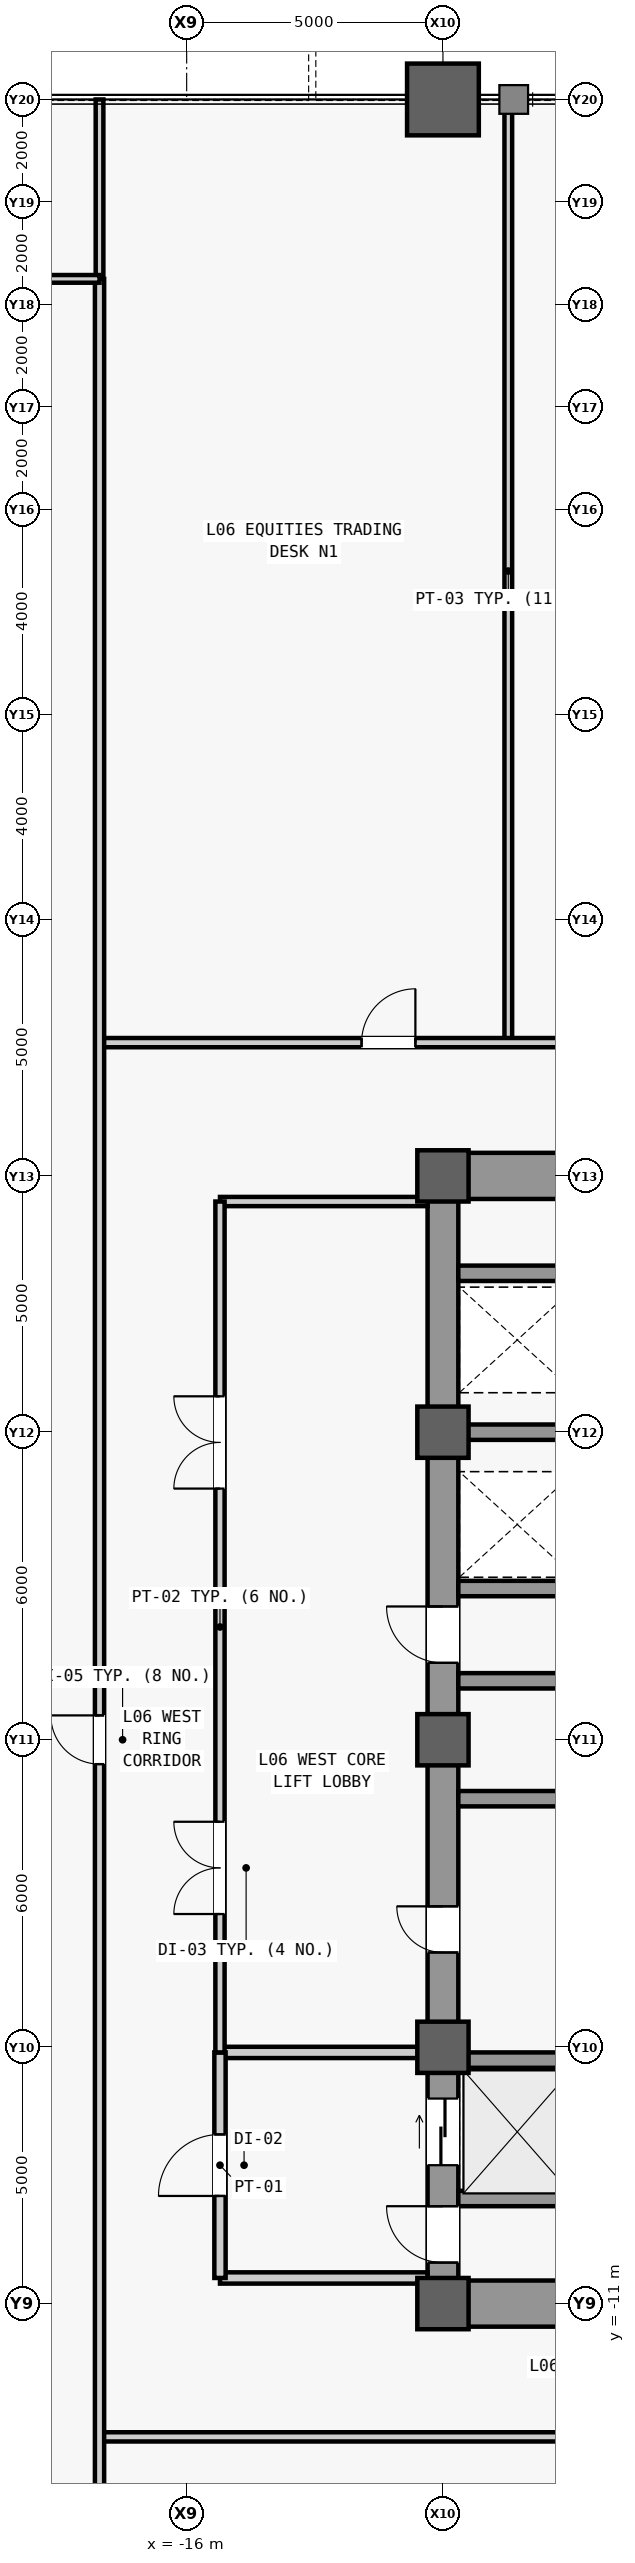
"""IFC4 building model, lengths in metres.
Left out: names, types, materials, properties, quantities, classifications, styles, units other than length and angle.
Written with IfcOpenShell. Run it as: python <this file> out.ifc"""

import sys

from ifc_helpers import new_model, si_unit, direction, frame, frame_2d, origin, origin_2d, place, context, subcontext, project, spatial, rectangle, hollow_rectangle, extrude, source, transform, mapped, element, fill, save


model = new_model("IFC4")
c1 = context("Model", 3, precision=1e-05, world=origin(), true_north=direction((0.0, 1.0)))
c2 = subcontext(c1, "Body", "Model", "MODEL_VIEW")
j1 = project(units=[si_unit("LENGTHUNIT", "METRE"), si_unit("PLANEANGLEUNIT", "RADIAN")], contexts=[c1])
p1 = place(None, origin())
s1 = spatial("IfcSite", under=j1, at=p1, CompositionType="ELEMENT")
p2 = place(p1, origin())
s2 = spatial("IfcBuilding", under=s1, at=p2, CompositionType="ELEMENT")
p3 = place(p2, frame((0.0, 0.0, 32.6)))
s3 = spatial("IfcBuildingStorey", under=s2, at=p3, CompositionType="ELEMENT", Elevation=32.6)
m1 = source(origin(), c2, "Body", "SweptSolid", [
    extrude(rectangle(XDim=22.0, YDim=0.6, at=frame_2d((11.0, 0.0))), origin(), (0.0, 0.0, 1.0), 3.94),
])
p4 = place(p3, frame((-11.0, -11.0, 0.0), z_axis=(0.0, 0.0, 1.0), x_axis=(0.0, 1.0, 0.0)))
e1 = element("IfcWall", 1, at=p4, inside=s3, PredefinedType="SHEAR", context=c2, shape_type="MappedRepresentation", body=[
    mapped(m1, transform((0.0, 0.0, 0.0), scale=1.0)),
])
m2 = source(origin(), c2, "Body", "SweptSolid", [
    extrude(rectangle(XDim=1.1, YDim=2.2, at=frame_2d((0.55, 1.1))), frame((0.0, 0.31, 0.0), z_axis=(0.0, -1.0, 0.0), x_axis=(1.0, 0.0, 0.0)), (0.0, 0.0, 1.0), 0.62),
])
p5 = place(p4, frame((0.8, 0.0, 0.0)))
e2 = element("IfcOpeningElement", 2, at=p5, cuts=e1, PredefinedType="OPENING", context=c2, shape_type="MappedRepresentation", body=[
    mapped(m2, transform((0.0, 0.0, 0.0), scale=1.0)),
])
p6 = place(p4, frame((12.5, 0.0, 0.0)))
e3 = element("IfcOpeningElement", 3, at=p6, cuts=e1, PredefinedType="OPENING", context=c2, shape_type="MappedRepresentation", body=[
    mapped(m2, transform((0.0, 0.0, 0.0), scale=1.0)),
])
m3 = source(origin(), c2, "Body", "SweptSolid", [
    extrude(rectangle(XDim=0.9, YDim=2.15, at=frame_2d((0.45, 1.075))), frame((0.0, 0.31, 0.0), z_axis=(0.0, -1.0, 0.0), x_axis=(1.0, 0.0, 0.0)), (0.0, 0.0, 1.0), 0.62),
])
p7 = place(p4, frame((6.85, 0.0, 0.0)))
e4 = element("IfcOpeningElement", 4, at=p7, cuts=e1, PredefinedType="OPENING", context=c2, shape_type="MappedRepresentation", body=[
    mapped(m3, transform((0.0, 0.0, 0.0), scale=1.0)),
])
m4 = source(origin(), c2, "Body", "SweptSolid", [
    extrude(rectangle(XDim=1.3, YDim=2.3, at=frame_2d((0.65, 1.15))), frame((0.0, 0.31, 0.0), z_axis=(0.0, -1.0, 0.0), x_axis=(1.0, 0.0, 0.0)), (0.0, 0.0, 1.0), 0.62),
])
p8 = place(p4, frame((2.7, 0.0, 0.0)))
e5 = element("IfcOpeningElement", 5, at=p8, cuts=e1, PredefinedType="OPENING", context=c2, shape_type="MappedRepresentation", body=[
    mapped(m4, transform((0.0, 0.0, 0.0), scale=1.0)),
])
m5 = source(origin(), c2, "Body", "SweptSolid", [
    extrude(rectangle(XDim=5.85, YDim=0.9, at=frame_2d((2.925, 0.0))), origin(), (0.0, 0.0, 1.0), 3.94),
])
for number, where, z_axis, x_axis in (
    (6, (-10.7, -11.0, 0.0), (0.0, 0.0, 1.0), (1.0, 0.0, 0.0)),
    (7, (-10.7, 11.0, 0.0), (0.0, 0.0, 1.0), (1.0, 0.0, 0.0)),
):
    element("IfcWall", number, at=place(p3, frame(where, z_axis=z_axis, x_axis=x_axis)), inside=s3, PredefinedType="SHEAR", context=c2, shape_type="MappedRepresentation", body=[
        mapped(m5, transform((0.0, 0.0, 0.0), scale=1.0)),
    ])
m6 = source(origin(), c2, "Body", "SweptSolid", [
    extrude(rectangle(XDim=5.6, YDim=0.3, at=frame_2d((2.8, 0.0))), origin(), (0.0, 0.0, 1.0), 3.94),
])
for number, where, z_axis, x_axis in (
    (8, (-10.7, -1.15, 0.0), (0.0, 0.0, 1.0), (1.0, 0.0, 0.0)),
    (9, (-10.7, 1.15, 0.0), (0.0, 0.0, 1.0), (1.0, 0.0, 0.0)),
):
    element("IfcWall", number, at=place(p3, frame(where, z_axis=z_axis, x_axis=x_axis)), inside=s3, PredefinedType="SHEAR", context=c2, shape_type="MappedRepresentation", body=[
        mapped(m6, transform((0.0, 0.0, 0.0), scale=1.0)),
    ])
m7 = source(origin(), c2, "Body", "SweptSolid", [
    extrude(rectangle(XDim=1.0, YDim=1.0, at=origin_2d()), origin(), (0.0, 0.0, 1.0), 4.2),
])
for number, where, z_axis, x_axis in (
    (10, (-11.0, -11.0, 0.0), (0.0, 0.0, 1.0), (1.0, 0.0, 0.0)),
    (11, (-11.0, -6.0, 0.0), (0.0, 0.0, 1.0), (1.0, 0.0, 0.0)),
    (12, (-11.0, 0.0, 0.0), (0.0, 0.0, 1.0), (1.0, 0.0, 0.0)),
    (13, (-11.0, 6.0, 0.0), (0.0, 0.0, 1.0), (1.0, 0.0, 0.0)),
    (14, (-11.0, 11.0, 0.0), (0.0, 0.0, 1.0), (1.0, 0.0, 0.0)),
):
    element("IfcColumn", number, at=place(p3, frame(where, z_axis=z_axis, x_axis=x_axis)), inside=s3, PredefinedType="COLUMN", context=c2, shape_type="MappedRepresentation", body=[
        mapped(m7, transform((0.0, 0.0, 0.0), scale=1.0)),
    ])
m8 = source(origin(), c2, "Body", "SweptSolid", [
    extrude(hollow_rectangle(XDim=1.4, YDim=1.4, WallThickness=0.075, at=origin_2d()), origin(), (0.0, 0.0, 1.0), 4.2),
])
p9 = place(p3, frame((-11.0, 32.0, 0.0), z_axis=(0.0, 0.0, 1.0), x_axis=(1.0, 0.0, 0.0)))
e15 = element("IfcColumn", 15, at=p9, inside=s3, PredefinedType="COLUMN", context=c2, shape_type="MappedRepresentation", body=[
    mapped(m8, transform((0.0, 0.0, 0.0), scale=1.0)),
])
m9 = source(origin(), c2, "Body", "SweptSolid", [
    extrude(rectangle(XDim=2.2, YDim=0.3, at=frame_2d((1.1, 0.0))), origin(), (0.0, 0.0, 1.0), 3.94),
])
for number, where, z_axis, x_axis in (
    (16, (-10.7, -8.95, 0.0), (0.0, 0.0, 1.0), (1.0, 0.0, 0.0)),
    (17, (-10.7, -6.25, 0.0), (0.0, 0.0, 1.0), (1.0, 0.0, 0.0)),
    (18, (-10.7, 2.95, 0.0), (0.0, 0.0, 1.0), (1.0, 0.0, 0.0)),
    (19, (-10.7, 6.0, 0.0), (0.0, 0.0, 1.0), (1.0, 0.0, 0.0)),
    (20, (-10.7, 9.1, 0.0), (0.0, 0.0, 1.0), (1.0, 0.0, 0.0)),
):
    element("IfcWall", number, at=place(p3, frame(where, z_axis=z_axis, x_axis=x_axis)), inside=s3, PredefinedType="SHEAR", context=c2, shape_type="MappedRepresentation", body=[
        mapped(m9, transform((0.0, 0.0, 0.0), scale=1.0)),
    ])
m10 = source(origin(), c2, "Body", "SweptSolid", [
    extrude(rectangle(XDim=4.05, YDim=0.22, at=frame_2d((2.025, 0.0))), origin(), (0.0, 0.0, 1.0), 3.94),
])
p10 = place(p3, frame((-15.35, -10.5, 0.0), z_axis=(0.0, 0.0, 1.0), x_axis=(1.0, 0.0, 0.0)))
e21 = element("IfcWall", 21, at=p10, inside=s3, PredefinedType="PARTITIONING", context=c2, shape_type="MappedRepresentation", body=[
    mapped(m10, transform((0.0, 0.0, 0.0), scale=1.0)),
])
m11 = source(origin(), c2, "Body", "SweptSolid", [
    extrude(rectangle(XDim=4.05, YDim=0.22, at=frame_2d((2.025, 0.0))), origin(), (0.0, 0.0, 1.0), 3.085),
])
p11 = place(p3, frame((-15.35, -6.1, 0.0), z_axis=(0.0, 0.0, 1.0), x_axis=(1.0, 0.0, 0.0)))
e22 = element("IfcWall", 22, at=p11, inside=s3, PredefinedType="PARTITIONING", context=c2, shape_type="MappedRepresentation", body=[
    mapped(m11, transform((0.0, 0.0, 0.0), scale=1.0)),
])
m12 = source(origin(), c2, "Body", "SweptSolid", [
    extrude(rectangle(XDim=4.4, YDim=0.22, at=frame_2d((2.2, 0.0))), origin(), (0.0, 0.0, 1.0), 3.94),
])
p12 = place(p3, frame((-15.35, -10.5, 0.0), z_axis=(0.0, 0.0, 1.0), x_axis=(0.0, 1.0, 0.0)))
e23 = element("IfcWall", 23, at=p12, inside=s3, PredefinedType="PARTITIONING", context=c2, shape_type="MappedRepresentation", body=[
    mapped(m12, transform((0.0, 0.0, 0.0), scale=1.0)),
])
m13 = source(origin(), c2, "Body", "SweptSolid", [
    extrude(rectangle(XDim=1.2, YDim=2.2, at=frame_2d((0.6, 1.1))), frame((0.0, 0.12, 0.0), z_axis=(0.0, -1.0, 0.0), x_axis=(1.0, 0.0, 0.0)), (0.0, 0.0, 1.0), 0.24),
])
p13 = place(p12, frame((1.6, 0.0, 0.0)))
e24 = element("IfcOpeningElement", 24, at=p13, cuts=e23, PredefinedType="OPENING", context=c2, shape_type="MappedRepresentation", body=[
    mapped(m13, transform((0.0, 0.0, 0.0), scale=1.0)),
])
m14 = source(origin(), c2, "Body", "SweptSolid", [
    extrude(rectangle(XDim=4.05, YDim=0.18, at=frame_2d((2.025, 0.0))), origin(), (0.0, 0.0, 1.0), 3.94),
])
p14 = place(p3, frame((-15.35, 10.5, 0.0), z_axis=(0.0, 0.0, 1.0), x_axis=(1.0, 0.0, 0.0)))
e25 = element("IfcWall", 25, at=p14, inside=s3, PredefinedType="PARTITIONING", context=c2, shape_type="MappedRepresentation", body=[
    mapped(m14, transform((0.0, 0.0, 0.0), scale=1.0)),
])
m15 = source(origin(), c2, "Body", "SweptSolid", [
    extrude(rectangle(XDim=16.6, YDim=0.18, at=frame_2d((8.3, 0.0))), origin(), (0.0, 0.0, 1.0), 3.94),
])
p15 = place(p3, frame((-15.35, -6.1, 0.0), z_axis=(0.0, 0.0, 1.0), x_axis=(0.0, 1.0, 0.0)))
e26 = element("IfcWall", 26, at=p15, inside=s3, PredefinedType="PARTITIONING", context=c2, shape_type="MappedRepresentation", body=[
    mapped(m15, transform((0.0, 0.0, 0.0), scale=1.0)),
])
m16 = source(origin(), c2, "Body", "SweptSolid", [
    extrude(rectangle(XDim=1.8, YDim=2.25, at=frame_2d((0.9, 1.125))), frame((0.0, 0.1, 0.0), z_axis=(0.0, -1.0, 0.0), x_axis=(1.0, 0.0, 0.0)), (0.0, 0.0, 1.0), 0.2),
])
p16 = place(p15, frame((2.7, 0.0, 0.0)))
e27 = element("IfcOpeningElement", 27, at=p16, cuts=e26, PredefinedType="OPENING", context=c2, shape_type="MappedRepresentation", body=[
    mapped(m16, transform((0.0, 0.0, 0.0), scale=1.0)),
])
p17 = place(p15, frame((11.0, 0.0, 0.0)))
e28 = element("IfcOpeningElement", 28, at=p17, cuts=e26, PredefinedType="OPENING", context=c2, shape_type="MappedRepresentation", body=[
    mapped(m16, transform((0.0, 0.0, 0.0), scale=1.0)),
])
m17 = source(origin(), c2, "Body", "SweptSolid", [
    extrude(rectangle(XDim=36.25, YDim=0.18, at=frame_2d((18.125, 0.0))), origin(), (0.0, 0.0, 1.0), 3.94),
])
p18 = place(p3, frame((-17.7, -13.6, 0.0), z_axis=(0.0, 0.0, 1.0), x_axis=(1.0, 0.0, 0.0)))
e29 = element("IfcWall", 29, at=p18, inside=s3, PredefinedType="PARTITIONING", context=c2, shape_type="MappedRepresentation", body=[
    mapped(m17, transform((0.0, 0.0, 0.0), scale=1.0)),
])
m18 = source(origin(), c2, "Body", "SweptSolid", [
    extrude(rectangle(XDim=1.05, YDim=2.2, at=frame_2d((0.525, 1.1))), frame((0.0, 0.1, 0.0), z_axis=(0.0, -1.0, 0.0), x_axis=(1.0, 0.0, 0.0)), (0.0, 0.0, 1.0), 0.2),
])
p19 = place(p18, frame((17.175, 0.0, 0.0)))
e30 = element("IfcOpeningElement", 30, at=p19, cuts=e29, PredefinedType="OPENING", context=c2, shape_type="MappedRepresentation", body=[
    mapped(m18, transform((0.0, 0.0, 0.0), scale=1.0)),
])
m19 = source(origin(), c2, "Body", "SweptSolid", [
    extrude(rectangle(XDim=18.4, YDim=0.15, at=frame_2d((9.2, 0.0))), origin(), (0.0, 0.0, 1.0), 3.94),
])
p20 = place(p3, frame((-9.725, 13.6, 0.0), z_axis=(0.0, 0.0, 1.0), x_axis=(0.0, 1.0, 0.0)))
e31 = element("IfcWall", 31, at=p20, inside=s3, PredefinedType="PARTITIONING", context=c2, shape_type="MappedRepresentation", body=[
    mapped(m19, transform((0.0, 0.0, 0.0), scale=1.0)),
])
p21 = place(p3, frame((-17.7, 13.6, 0.0), z_axis=(0.0, 0.0, 1.0), x_axis=(1.0, 0.0, 0.0)))
e32 = element("IfcWall", 32, at=p21, inside=s3, PredefinedType="PARTITIONING", context=c2, shape_type="MappedRepresentation", body=[
    mapped(m17, transform((0.0, 0.0, 0.0), scale=1.0)),
])
p22 = place(p21, frame((5.113, 0.0, 0.0)))
e33 = element("IfcOpeningElement", 33, at=p22, cuts=e32, PredefinedType="OPENING", context=c2, shape_type="MappedRepresentation", body=[
    mapped(m18, transform((0.0, 0.0, 0.0), scale=1.0)),
])
p23 = place(p21, frame((12.525, 0.0, 0.0)))
e34 = element("IfcOpeningElement", 34, at=p23, cuts=e32, PredefinedType="OPENING", context=c2, shape_type="MappedRepresentation", body=[
    mapped(m18, transform((0.0, 0.0, 0.0), scale=1.0)),
])
p24 = place(p21, frame((22.675, 0.0, 0.0)))
e35 = element("IfcOpeningElement", 35, at=p24, cuts=e32, PredefinedType="OPENING", context=c2, shape_type="MappedRepresentation", body=[
    mapped(m18, transform((0.0, 0.0, 0.0), scale=1.0)),
])
p25 = place(p21, frame((29.663, 0.0, 0.0)))
e36 = element("IfcOpeningElement", 36, at=p25, cuts=e32, PredefinedType="OPENING", context=c2, shape_type="MappedRepresentation", body=[
    mapped(m18, transform((0.0, 0.0, 0.0), scale=1.0)),
])
m20 = source(origin(), c2, "Body", "SweptSolid", [
    extrude(rectangle(XDim=3.5, YDim=0.15, at=frame_2d((1.75, 0.0))), origin(), (0.0, 0.0, 1.0), 3.94),
])
p26 = place(p3, frame((-17.7, 28.5, 0.0), z_axis=(0.0, 0.0, 1.0), x_axis=(0.0, 1.0, 0.0)))
e37 = element("IfcWall", 37, at=p26, inside=s3, PredefinedType="PARTITIONING", context=c2, shape_type="MappedRepresentation", body=[
    mapped(m20, transform((0.0, 0.0, 0.0), scale=1.0)),
])
m21 = source(origin(), c2, "Body", "SweptSolid", [
    extrude(rectangle(XDim=57.0, YDim=0.18, at=frame_2d((28.5, 0.0))), origin(), (0.0, 0.0, 1.0), 3.94),
])
p27 = place(p3, frame((-17.7, -28.5, 0.0), z_axis=(0.0, 0.0, 1.0), x_axis=(0.0, 1.0, 0.0)))
e38 = element("IfcWall", 38, at=p27, inside=s3, PredefinedType="PARTITIONING", context=c2, shape_type="MappedRepresentation", body=[
    mapped(m21, transform((0.0, 0.0, 0.0), scale=1.0)),
])
m22 = source(origin(), c2, "Body", "SweptSolid", [
    extrude(rectangle(XDim=0.95, YDim=2.15, at=frame_2d((0.475, 1.075))), frame((0.0, 0.1, 0.0), z_axis=(0.0, -1.0, 0.0), x_axis=(1.0, 0.0, 0.0)), (0.0, 0.0, 1.0), 0.2),
])
p28 = place(p27, frame((28.025, 0.0, 0.0)))
e39 = element("IfcOpeningElement", 39, at=p28, cuts=e38, PredefinedType="OPENING", context=c2, shape_type="MappedRepresentation", body=[
    mapped(m22, transform((0.0, 0.0, 0.0), scale=1.0)),
])
m23 = source(origin(), c2, "Body", "SweptSolid", [
    extrude(rectangle(XDim=10.8, YDim=0.15, at=frame_2d((5.4, 0.0))), origin(), (0.0, 0.0, 1.0), 3.94),
])
p29 = place(p3, frame((-28.5, 28.5, 0.0), z_axis=(0.0, 0.0, 1.0), x_axis=(1.0, 0.0, 0.0)))
e40 = element("IfcWall", 40, at=p29, inside=s3, PredefinedType="PARTITIONING", context=c2, shape_type="MappedRepresentation", body=[
    mapped(m23, transform((0.0, 0.0, 0.0), scale=1.0)),
])
m24 = source(origin(), c2, "Body", "SweptSolid", [
    extrude(rectangle(XDim=0.95, YDim=2.15, at=frame_2d((0.475, 1.075))), frame((0.0, 0.085, 0.0), z_axis=(0.0, -1.0, 0.0), x_axis=(1.0, 0.0, 0.0)), (0.0, 0.0, 1.0), 0.17),
])
p30 = place(p29, frame((4.925, 0.0, 0.0)))
e41 = element("IfcOpeningElement", 41, at=p30, cuts=e40, PredefinedType="OPENING", context=c2, shape_type="MappedRepresentation", body=[
    mapped(m24, transform((0.0, 0.0, 0.0), scale=1.0)),
])
m25 = source(origin(), c2, "Body", "SweptSolid", [
    extrude(rectangle(XDim=1.1, YDim=2.2, at=frame_2d((0.55, 1.1))), frame((0.0, 0.025, 0.0), z_axis=(0.0, -1.0, 0.0), x_axis=(1.0, 0.0, 0.0)), (0.0, 0.0, 1.0), 0.05),
])
p31 = place(p5, origin())
e42 = element("IfcDoor", 42, at=p31, inside=s3, OperationType="SINGLE_SWING_RIGHT", PredefinedType="DOOR", context=c2, shape_type="MappedRepresentation", body=[
    mapped(m25, transform((0.0, 0.0, 0.0), scale=1.0)),
])
fill(e2, e42)
p32 = place(p6, origin())
e43 = element("IfcDoor", 43, at=p32, inside=s3, OperationType="SINGLE_SWING_RIGHT", PredefinedType="DOOR", context=c2, shape_type="MappedRepresentation", body=[
    mapped(m25, transform((0.0, 0.0, 0.0), scale=1.0)),
])
fill(e3, e43)
m26 = source(origin(), c2, "Body", "SweptSolid", [
    extrude(rectangle(XDim=0.9, YDim=2.15, at=frame_2d((0.45, 1.075))), frame((0.0, 0.025, 0.0), z_axis=(0.0, -1.0, 0.0), x_axis=(1.0, 0.0, 0.0)), (0.0, 0.0, 1.0), 0.05),
])
p33 = place(p7, origin())
e44 = element("IfcDoor", 44, at=p33, inside=s3, OperationType="SINGLE_SWING_RIGHT", PredefinedType="DOOR", context=c2, shape_type="MappedRepresentation", body=[
    mapped(m26, transform((0.0, 0.0, 0.0), scale=1.0)),
])
fill(e4, e44)
m27 = source(origin(), c2, "Body", "SweptSolid", [
    extrude(rectangle(XDim=1.2, YDim=2.2, at=frame_2d((0.6, 1.1))), frame((0.0, 0.025, 0.0), z_axis=(0.0, -1.0, 0.0), x_axis=(1.0, 0.0, 0.0)), (0.0, 0.0, 1.0), 0.05),
])
p34 = place(p13, origin())
e45 = element("IfcDoor", 45, at=p34, inside=s3, OperationType="SINGLE_SWING_LEFT", PredefinedType="DOOR", context=c2, shape_type="MappedRepresentation", body=[
    mapped(m27, transform((0.0, 0.0, 0.0), scale=1.0)),
])
fill(e24, e45)
m28 = source(origin(), c2, "Body", "SweptSolid", [
    extrude(rectangle(XDim=1.8, YDim=2.25, at=frame_2d((0.9, 1.125))), frame((0.0, 0.025, 0.0), z_axis=(0.0, -1.0, 0.0), x_axis=(1.0, 0.0, 0.0)), (0.0, 0.0, 1.0), 0.05),
])
p35 = place(p16, origin())
e46 = element("IfcDoor", 46, at=p35, inside=s3, OperationType="SINGLE_SWING_LEFT", PredefinedType="DOOR", context=c2, shape_type="MappedRepresentation", body=[
    mapped(m28, transform((0.0, 0.0, 0.0), scale=1.0)),
])
fill(e27, e46)
p36 = place(p17, origin())
e47 = element("IfcDoor", 47, at=p36, inside=s3, OperationType="SINGLE_SWING_RIGHT", PredefinedType="DOOR", context=c2, shape_type="MappedRepresentation", body=[
    mapped(m28, transform((0.0, 0.0, 0.0), scale=1.0)),
])
fill(e28, e47)
m29 = source(origin(), c2, "Body", "SweptSolid", [
    extrude(rectangle(XDim=1.05, YDim=2.2, at=frame_2d((0.525, 1.1))), frame((0.0, 0.025, 0.0), z_axis=(0.0, -1.0, 0.0), x_axis=(1.0, 0.0, 0.0)), (0.0, 0.0, 1.0), 0.05),
])
p37 = place(p22, origin())
e48 = element("IfcDoor", 48, at=p37, inside=s3, OperationType="SINGLE_SWING_RIGHT", PredefinedType="DOOR", context=c2, shape_type="MappedRepresentation", body=[
    mapped(m29, transform((0.0, 0.0, 0.0), scale=1.0)),
])
fill(e33, e48)
m30 = source(origin(), c2, "Body", "SweptSolid", [
    extrude(rectangle(XDim=0.95, YDim=2.15, at=frame_2d((0.475, 1.075))), frame((0.0, 0.025, 0.0), z_axis=(0.0, -1.0, 0.0), x_axis=(1.0, 0.0, 0.0)), (0.0, 0.0, 1.0), 0.05),
])
p38 = place(p28, origin())
e49 = element("IfcDoor", 49, at=p38, inside=s3, OperationType="SINGLE_SWING_RIGHT", PredefinedType="DOOR", context=c2, shape_type="MappedRepresentation", body=[
    mapped(m30, transform((0.0, 0.0, 0.0), scale=1.0)),
])
fill(e39, e49)
m31 = source(origin(), c2, "Body", "SweptSolid", [
    extrude(rectangle(XDim=1.3, YDim=2.3, at=frame_2d((0.65, 1.15))), frame((0.0, 0.025, 0.0), z_axis=(0.0, -1.0, 0.0), x_axis=(1.0, 0.0, 0.0)), (0.0, 0.0, 1.0), 0.05),
])
p39 = place(p8, origin())
e50 = element("IfcDoor", 50, at=p39, inside=s3, OperationType="SLIDING_TO_LEFT", PredefinedType="DOOR", context=c2, shape_type="MappedRepresentation", body=[
    mapped(m31, transform((0.0, 0.0, 0.0), scale=1.0)),
])
fill(e5, e50)
save(model, sys.argv[1])
